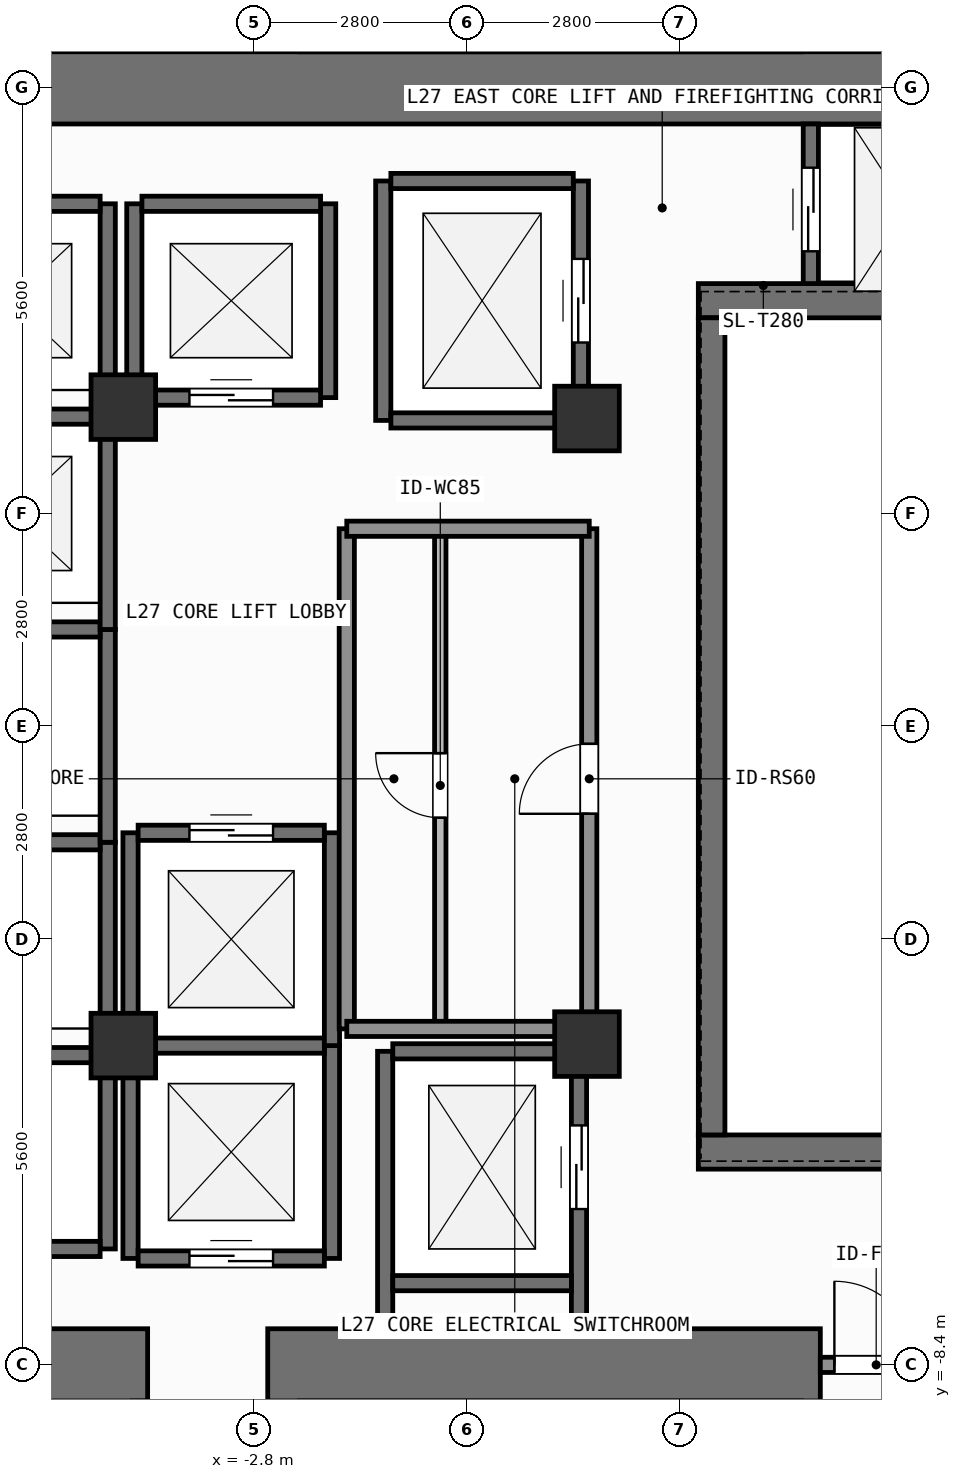
"""IFC4 building model, lengths in metres.
Left out: names, types, materials, properties, quantities, classifications, styles, units other than length and angle.
Written with IfcOpenShell. Run it as: python <this file> out.ifc"""

import sys

from ifc_helpers import new_model, si_unit, direction, frame, frame_2d, origin, origin_2d, place, context, subcontext, project, spatial, rectangle, extrude, element, fill, save


model = new_model("IFC4")
c1 = context("Model", 3, precision=1e-05, world=origin(), true_north=direction((0.0, 1.0)))
c2 = subcontext(c1, "Body", "Model", "MODEL_VIEW")
j1 = project(units=[si_unit("LENGTHUNIT", "METRE"), si_unit("PLANEANGLEUNIT", "RADIAN")], contexts=[c1])
p1 = place(None, origin())
s1 = spatial("IfcSite", under=j1, at=p1, CompositionType="ELEMENT")
p2 = place(p1, origin())
s2 = spatial("IfcBuilding", under=s1, at=p2, CompositionType="ELEMENT")
p3 = place(p2, frame((0.0, 0.0, 108.6)))
s3 = spatial("IfcBuildingStorey", under=s2, at=p3, CompositionType="ELEMENT", Elevation=108.6)
p4 = place(p3, frame((-7.55, -8.4, 0.0), z_axis=(0.0, 0.0, 1.0), x_axis=(1.0, 0.0, 0.0)))
e1 = element("IfcWall", 1, at=p4, inside=s3, PredefinedType="SHEAR", context=c2, shape_type="SweptSolid", body=[
    extrude(rectangle(XDim=3.35, YDim=0.95, at=frame_2d((1.675, 0.0))), origin(), (0.0, 0.0, 1.0), 4.8),
])
p5 = place(p3, frame((-2.62, -8.4, 0.0), z_axis=(0.0, 0.0, 1.0), x_axis=(1.0, 0.0, 0.0)))
e2 = element("IfcWall", 2, at=p5, inside=s3, PredefinedType="SHEAR", context=c2, shape_type="SweptSolid", body=[
    extrude(rectangle(XDim=7.27, YDim=0.95, at=frame_2d((3.635, 0.0))), origin(), (0.0, 0.0, 1.0), 4.8),
])
p6 = place(p3, frame((-7.55, 8.4, 0.0), z_axis=(0.0, 0.0, 1.0), x_axis=(1.0, 0.0, 0.0)))
e3 = element("IfcWall", 3, at=p6, inside=s3, PredefinedType="SHEAR", context=c2, shape_type="SweptSolid", body=[
    extrude(rectangle(XDim=16.425, YDim=0.95, at=frame_2d((8.212, 0.0))), origin(), (0.0, 0.0, 1.0), 4.8),
])
for number, where, z_axis, x_axis in (
    (4, (3.045, -5.6, 0.0), (0.0, 0.0, 1.0), (1.0, 0.0, 0.0)),
    (5, (3.045, 5.6, 0.0), (0.0, 0.0, 1.0), (1.0, 0.0, 0.0)),
):
    element("IfcWall", number, at=place(p3, frame(where, z_axis=z_axis, x_axis=x_axis)), inside=s3, PredefinedType="SHEAR", context=c2, shape_type="SweptSolid", body=[
        extrude(rectangle(XDim=5.83, YDim=0.45, at=frame_2d((2.915, 0.0))), origin(), (0.0, 0.0, 1.0), 4.8),
    ])
p7 = place(p3, frame((3.22, -5.375, 0.0), z_axis=(0.0, 0.0, 1.0), x_axis=(0.0, 1.0, 0.0)))
e6 = element("IfcWall", 6, at=p7, inside=s3, PredefinedType="SHEAR", context=c2, shape_type="SweptSolid", body=[
    extrude(rectangle(XDim=10.75, YDim=0.35, at=frame_2d((5.375, 0.0))), origin(), (0.0, 0.0, 1.0), 4.8),
])
for number, where, z_axis, x_axis in (
    (7, (-4.52, -4.2, 0.0), (0.0, 0.0, 1.0), (1.0, 0.0, 0.0)),
    (8, (1.58, -4.18, 0.0), (0.0, 0.0, 1.0), (1.0, 0.0, 0.0)),
    (9, (1.58, 4.05, 0.0), (0.0, 0.0, 1.0), (1.0, 0.0, 0.0)),
    (10, (-4.52, 4.2, 0.0), (0.0, 0.0, 1.0), (1.0, 0.0, 0.0)),
):
    element("IfcColumn", number, at=place(p3, frame(where, z_axis=z_axis, x_axis=x_axis)), inside=s3, PredefinedType="COLUMN", context=c2, shape_type="SweptSolid", body=[
        extrude(rectangle(XDim=0.85, YDim=0.85, at=origin_2d()), origin(), (0.0, 0.0, 1.0), 4.8),
    ])
p8 = place(p3, frame((-4.725, -6.875, 0.0), z_axis=(0.0, 0.0, 1.0), x_axis=(0.0, 1.0, 0.0)))
e11 = element("IfcWall", 11, at=p8, inside=s3, PredefinedType="SHEAR", context=c2, shape_type="SweptSolid", body=[
    extrude(rectangle(XDim=2.55, YDim=0.2, at=frame_2d((1.275, 0.0))), origin(), (0.0, 0.0, 1.0), 4.58),
])
for number, where, z_axis, x_axis in (
    (12, (-7.175, -6.875, 0.0), (0.0, 0.0, 1.0), (1.0, 0.0, 0.0)),
    (13, (-7.175, -4.325, 0.0), (0.0, 0.0, 1.0), (1.0, 0.0, 0.0)),
):
    element("IfcWall", number, at=place(p3, frame(where, z_axis=z_axis, x_axis=x_axis)), inside=s3, PredefinedType="SHEAR", context=c2, shape_type="SweptSolid", body=[
        extrude(rectangle(XDim=2.35, YDim=0.2, at=frame_2d((1.175, 0.0))), origin(), (0.0, 0.0, 1.0), 4.58),
    ])
p9 = place(p3, frame((-4.725, -4.325, 0.0), z_axis=(0.0, 0.0, 1.0), x_axis=(0.0, 1.0, 0.0)))
e14 = element("IfcWall", 14, at=p9, inside=s3, PredefinedType="SHEAR", context=c2, shape_type="SweptSolid", body=[
    extrude(rectangle(XDim=2.8, YDim=0.2, at=frame_2d((1.4, 0.0))), origin(), (0.0, 0.0, 1.0), 4.58),
])
p10 = place(p3, frame((-7.175, -1.525, 0.0), z_axis=(0.0, 0.0, 1.0), x_axis=(1.0, 0.0, 0.0)))
e15 = element("IfcWall", 15, at=p10, inside=s3, PredefinedType="SHEAR", context=c2, shape_type="SweptSolid", body=[
    extrude(rectangle(XDim=2.35, YDim=0.2, at=frame_2d((1.175, 0.0))), origin(), (0.0, 0.0, 1.0), 4.58),
])
p11 = place(p3, frame((-4.725, -1.525, 0.0), z_axis=(0.0, 0.0, 1.0), x_axis=(0.0, 1.0, 0.0)))
e16 = element("IfcWall", 16, at=p11, inside=s3, PredefinedType="SHEAR", context=c2, shape_type="SweptSolid", body=[
    extrude(rectangle(XDim=2.8, YDim=0.2, at=frame_2d((1.4, 0.0))), origin(), (0.0, 0.0, 1.0), 4.58),
])
p12 = place(p3, frame((-7.175, 1.275, 0.0), z_axis=(0.0, 0.0, 1.0), x_axis=(1.0, 0.0, 0.0)))
e17 = element("IfcWall", 17, at=p12, inside=s3, PredefinedType="SHEAR", context=c2, shape_type="SweptSolid", body=[
    extrude(rectangle(XDim=2.35, YDim=0.2, at=frame_2d((1.175, 0.0))), origin(), (0.0, 0.0, 1.0), 4.58),
])
p13 = place(p3, frame((-4.725, 1.275, 0.0), z_axis=(0.0, 0.0, 1.0), x_axis=(0.0, 1.0, 0.0)))
e18 = element("IfcWall", 18, at=p13, inside=s3, PredefinedType="SHEAR", context=c2, shape_type="SweptSolid", body=[
    extrude(rectangle(XDim=2.8, YDim=0.2, at=frame_2d((1.4, 0.0))), origin(), (0.0, 0.0, 1.0), 4.58),
])
p14 = place(p3, frame((-7.175, 4.075, 0.0), z_axis=(0.0, 0.0, 1.0), x_axis=(1.0, 0.0, 0.0)))
e19 = element("IfcWall", 19, at=p14, inside=s3, PredefinedType="SHEAR", context=c2, shape_type="SweptSolid", body=[
    extrude(rectangle(XDim=2.35, YDim=0.2, at=frame_2d((1.175, 0.0))), origin(), (0.0, 0.0, 1.0), 4.58),
])
p15 = place(p3, frame((-4.725, 4.075, 0.0), z_axis=(0.0, 0.0, 1.0), x_axis=(0.0, 1.0, 0.0)))
e20 = element("IfcWall", 20, at=p15, inside=s3, PredefinedType="SHEAR", context=c2, shape_type="SweptSolid", body=[
    extrude(rectangle(XDim=2.8, YDim=0.2, at=frame_2d((1.4, 0.0))), origin(), (0.0, 0.0, 1.0), 4.58),
])
p16 = place(p3, frame((-7.175, 6.875, 0.0), z_axis=(0.0, 0.0, 1.0), x_axis=(1.0, 0.0, 0.0)))
e21 = element("IfcWall", 21, at=p16, inside=s3, PredefinedType="SHEAR", context=c2, shape_type="SweptSolid", body=[
    extrude(rectangle(XDim=2.35, YDim=0.2, at=frame_2d((1.175, 0.0))), origin(), (0.0, 0.0, 1.0), 4.58),
])
for number, where, z_axis, x_axis in (
    (22, (-4.375, 4.325, 0.0), (0.0, 0.0, 1.0), (0.0, 1.0, 0.0)),
    (23, (-1.825, 4.325, 0.0), (0.0, 0.0, 1.0), (0.0, 1.0, 0.0)),
):
    element("IfcWall", number, at=place(p3, frame(where, z_axis=z_axis, x_axis=x_axis)), inside=s3, PredefinedType="SHEAR", context=c2, shape_type="SweptSolid", body=[
        extrude(rectangle(XDim=2.55, YDim=0.2, at=frame_2d((1.275, 0.0))), origin(), (0.0, 0.0, 1.0), 4.58),
    ])
p17 = place(p3, frame((-4.275, 4.325, 0.0), z_axis=(0.0, 0.0, 1.0), x_axis=(1.0, 0.0, 0.0)))
e24 = element("IfcWall", 24, at=p17, inside=s3, PredefinedType="SHEAR", context=c2, shape_type="SweptSolid", body=[
    extrude(rectangle(XDim=2.35, YDim=0.2, at=frame_2d((1.175, 0.0))), origin(), (0.0, 0.0, 1.0), 4.58),
])
p18 = place(p17, frame((0.625, 0.0, 0.0)))
e25 = element("IfcOpeningElement", 25, at=p18, cuts=e24, PredefinedType="OPENING", context=c2, shape_type="SweptSolid", body=[
    extrude(rectangle(XDim=1.1, YDim=2.2, at=frame_2d((0.55, 1.1))), frame((0.0, 0.11, 0.0), z_axis=(0.0, -1.0, 0.0), x_axis=(1.0, 0.0, 0.0)), (0.0, 0.0, 1.0), 0.22),
])
p19 = place(p3, frame((-4.275, 6.875, 0.0), z_axis=(0.0, 0.0, 1.0), x_axis=(1.0, 0.0, 0.0)))
e26 = element("IfcWall", 26, at=p19, inside=s3, PredefinedType="SHEAR", context=c2, shape_type="SweptSolid", body=[
    extrude(rectangle(XDim=2.35, YDim=0.2, at=frame_2d((1.175, 0.0))), origin(), (0.0, 0.0, 1.0), 4.58),
])
for number, where, z_axis, x_axis in (
    (27, (-4.425, -7.0, 0.0), (0.0, 0.0, 1.0), (0.0, 1.0, 0.0)),
    (28, (-1.775, -7.0, 0.0), (0.0, 0.0, 1.0), (0.0, 1.0, 0.0)),
):
    element("IfcWall", number, at=place(p3, frame(where, z_axis=z_axis, x_axis=x_axis)), inside=s3, PredefinedType="SHEAR", context=c2, shape_type="SweptSolid", body=[
        extrude(rectangle(XDim=2.8, YDim=0.2, at=frame_2d((1.4, 0.0))), origin(), (0.0, 0.0, 1.0), 4.58),
    ])
p20 = place(p3, frame((-4.325, -7.0, 0.0), z_axis=(0.0, 0.0, 1.0), x_axis=(1.0, 0.0, 0.0)))
e29 = element("IfcWall", 29, at=p20, inside=s3, PredefinedType="SHEAR", context=c2, shape_type="SweptSolid", body=[
    extrude(rectangle(XDim=2.45, YDim=0.2, at=frame_2d((1.225, 0.0))), origin(), (0.0, 0.0, 1.0), 4.58),
])
p21 = place(p20, frame((0.675, 0.0, 0.0)))
e30 = element("IfcOpeningElement", 30, at=p21, cuts=e29, PredefinedType="OPENING", context=c2, shape_type="SweptSolid", body=[
    extrude(rectangle(XDim=1.1, YDim=2.2, at=frame_2d((0.55, 1.1))), frame((0.0, 0.11, 0.0), z_axis=(0.0, -1.0, 0.0), x_axis=(1.0, 0.0, 0.0)), (0.0, 0.0, 1.0), 0.22),
])
p22 = place(p3, frame((-4.325, -4.2, 0.0), z_axis=(0.0, 0.0, 1.0), x_axis=(1.0, 0.0, 0.0)))
e31 = element("IfcWall", 31, at=p22, inside=s3, PredefinedType="SHEAR", context=c2, shape_type="SweptSolid", body=[
    extrude(rectangle(XDim=2.45, YDim=0.2, at=frame_2d((1.225, 0.0))), origin(), (0.0, 0.0, 1.0), 4.58),
])
for number, where, z_axis, x_axis in (
    (32, (-4.425, -4.2, 0.0), (0.0, 0.0, 1.0), (0.0, 1.0, 0.0)),
    (33, (-1.775, -4.2, 0.0), (0.0, 0.0, 1.0), (0.0, 1.0, 0.0)),
):
    element("IfcWall", number, at=place(p3, frame(where, z_axis=z_axis, x_axis=x_axis)), inside=s3, PredefinedType="SHEAR", context=c2, shape_type="SweptSolid", body=[
        extrude(rectangle(XDim=2.8, YDim=0.2, at=frame_2d((1.4, 0.0))), origin(), (0.0, 0.0, 1.0), 4.58),
    ])
p23 = place(p3, frame((-4.325, -1.4, 0.0), z_axis=(0.0, 0.0, 1.0), x_axis=(1.0, 0.0, 0.0)))
e34 = element("IfcWall", 34, at=p23, inside=s3, PredefinedType="SHEAR", context=c2, shape_type="SweptSolid", body=[
    extrude(rectangle(XDim=2.45, YDim=0.2, at=frame_2d((1.225, 0.0))), origin(), (0.0, 0.0, 1.0), 4.58),
])
p24 = place(p23, frame((0.675, 0.0, 0.0)))
e35 = element("IfcOpeningElement", 35, at=p24, cuts=e34, PredefinedType="OPENING", context=c2, shape_type="SweptSolid", body=[
    extrude(rectangle(XDim=1.1, YDim=2.2, at=frame_2d((0.55, 1.1))), frame((0.0, 0.11, 0.0), z_axis=(0.0, -1.0, 0.0), x_axis=(1.0, 0.0, 0.0)), (0.0, 0.0, 1.0), 0.22),
])
p25 = place(p3, frame((-1.1, 4.025, 0.0), z_axis=(0.0, 0.0, 1.0), x_axis=(0.0, 1.0, 0.0)))
e36 = element("IfcWall", 36, at=p25, inside=s3, PredefinedType="SHEAR", context=c2, shape_type="SweptSolid", body=[
    extrude(rectangle(XDim=3.15, YDim=0.2, at=frame_2d((1.575, 0.0))), origin(), (0.0, 0.0, 1.0), 4.58),
])
p26 = place(p3, frame((1.5, 4.025, 0.0), z_axis=(0.0, 0.0, 1.0), x_axis=(0.0, 1.0, 0.0)))
e37 = element("IfcWall", 37, at=p26, inside=s3, PredefinedType="SHEAR", context=c2, shape_type="SweptSolid", body=[
    extrude(rectangle(XDim=3.15, YDim=0.2, at=frame_2d((1.575, 0.0))), origin(), (0.0, 0.0, 1.0), 4.58),
])
p27 = place(p26, frame((1.025, 0.0, 0.0)))
e38 = element("IfcOpeningElement", 38, at=p27, cuts=e37, PredefinedType="OPENING", context=c2, shape_type="SweptSolid", body=[
    extrude(rectangle(XDim=1.1, YDim=2.2, at=frame_2d((0.55, 1.1))), frame((0.0, 0.11, 0.0), z_axis=(0.0, -1.0, 0.0), x_axis=(1.0, 0.0, 0.0)), (0.0, 0.0, 1.0), 0.22),
])
for number, where, z_axis, x_axis in (
    (39, (-1.0, 4.025, 0.0), (0.0, 0.0, 1.0), (1.0, 0.0, 0.0)),
    (40, (-1.0, 7.175, 0.0), (0.0, 0.0, 1.0), (1.0, 0.0, 0.0)),
):
    element("IfcWall", number, at=place(p3, frame(where, z_axis=z_axis, x_axis=x_axis)), inside=s3, PredefinedType="SHEAR", context=c2, shape_type="SweptSolid", body=[
        extrude(rectangle(XDim=2.4, YDim=0.2, at=frame_2d((1.2, 0.0))), origin(), (0.0, 0.0, 1.0), 4.58),
    ])
p28 = place(p3, frame((-1.075, -7.925, 0.0), z_axis=(0.0, 0.0, 1.0), x_axis=(0.0, 1.0, 0.0)))
e41 = element("IfcWall", 41, at=p28, inside=s3, PredefinedType="SHEAR", context=c2, shape_type="SweptSolid", body=[
    extrude(rectangle(XDim=3.65, YDim=0.2, at=frame_2d((1.825, 0.0))), origin(), (0.0, 0.0, 1.0), 4.58),
])
p29 = place(p3, frame((1.475, -7.925, 0.0), z_axis=(0.0, 0.0, 1.0), x_axis=(0.0, 1.0, 0.0)))
e42 = element("IfcWall", 42, at=p29, inside=s3, PredefinedType="SHEAR", context=c2, shape_type="SweptSolid", body=[
    extrude(rectangle(XDim=3.65, YDim=0.2, at=frame_2d((1.825, 0.0))), origin(), (0.0, 0.0, 1.0), 4.58),
])
p30 = place(p29, frame((1.575, 0.0, 0.0)))
e43 = element("IfcOpeningElement", 43, at=p30, cuts=e42, PredefinedType="OPENING", context=c2, shape_type="SweptSolid", body=[
    extrude(rectangle(XDim=1.1, YDim=2.2, at=frame_2d((0.55, 1.1))), frame((0.0, 0.11, 0.0), z_axis=(0.0, -1.0, 0.0), x_axis=(1.0, 0.0, 0.0)), (0.0, 0.0, 1.0), 0.22),
])
for number, where, z_axis, x_axis in (
    (44, (-0.975, -7.325, 0.0), (0.0, 0.0, 1.0), (1.0, 0.0, 0.0)),
    (45, (-0.975, -4.275, 0.0), (0.0, 0.0, 1.0), (1.0, 0.0, 0.0)),
):
    element("IfcWall", number, at=place(p3, frame(where, z_axis=z_axis, x_axis=x_axis)), inside=s3, PredefinedType="SHEAR", context=c2, shape_type="SweptSolid", body=[
        extrude(rectangle(XDim=2.35, YDim=0.2, at=frame_2d((1.175, 0.0))), origin(), (0.0, 0.0, 1.0), 4.58),
    ])
p31 = place(p3, frame((4.525, 5.825, 0.0), z_axis=(0.0, 0.0, 1.0), x_axis=(0.0, 1.0, 0.0)))
e46 = element("IfcWall", 46, at=p31, inside=s3, PredefinedType="SHEAR", context=c2, shape_type="SweptSolid", body=[
    extrude(rectangle(XDim=2.1, YDim=0.2, at=frame_2d((1.05, 0.0))), origin(), (0.0, 0.0, 1.0), 4.58),
])
p32 = place(p31, frame((0.425, 0.0, 0.0)))
e47 = element("IfcOpeningElement", 47, at=p32, cuts=e46, PredefinedType="OPENING", context=c2, shape_type="SweptSolid", body=[
    extrude(rectangle(XDim=1.1, YDim=2.2, at=frame_2d((0.55, 1.1))), frame((0.0, 0.11, 0.0), z_axis=(0.0, -1.0, 0.0), x_axis=(1.0, 0.0, 0.0)), (0.0, 0.0, 1.0), 0.22),
])
p33 = place(p3, frame((4.65, -8.4, 0.0), z_axis=(0.0, 0.0, 1.0), x_axis=(1.0, 0.0, 0.0)))
e48 = element("IfcWall", 48, at=p33, inside=s3, PredefinedType="SOLIDWALL", context=c2, shape_type="SweptSolid", body=[
    extrude(rectangle(XDim=1.47, YDim=0.2, at=frame_2d((0.735, 0.0))), origin(), (0.0, 0.0, 1.0), 3.62),
])
p34 = place(p33, frame((0.185, 0.0, 0.0)))
e49 = element("IfcOpeningElement", 49, at=p34, cuts=e48, PredefinedType="OPENING", context=c2, shape_type="SweptSolid", body=[
    extrude(rectangle(XDim=1.1, YDim=2.15, at=frame_2d((0.55, 1.075))), frame((0.0, 0.11, 0.0), z_axis=(0.0, -1.0, 0.0), x_axis=(1.0, 0.0, 0.0)), (0.0, 0.0, 1.0), 0.22),
])
p35 = place(p3, frame((-0.35, -3.98, 0.0), z_axis=(0.0, 0.0, 1.0), x_axis=(0.0, 1.0, 0.0)))
e50 = element("IfcWall", 50, at=p35, inside=s3, PredefinedType="PARTITIONING", context=c2, shape_type="SweptSolid", body=[
    extrude(rectangle(XDim=6.58, YDim=0.15, at=frame_2d((3.29, 0.0))), origin(), (0.0, 0.0, 1.0), 4.58),
])
p36 = place(p35, frame((2.778, 0.0, 0.0)))
e51 = element("IfcOpeningElement", 51, at=p36, cuts=e50, PredefinedType="OPENING", context=c2, shape_type="SweptSolid", body=[
    extrude(rectangle(XDim=0.85, YDim=2.1, at=frame_2d((0.425, 1.05))), frame((0.0, 0.085, 0.0), z_axis=(0.0, -1.0, 0.0), x_axis=(1.0, 0.0, 0.0)), (0.0, 0.0, 1.0), 0.17),
])
p37 = place(p3, frame((1.61, -3.98, 0.0), z_axis=(0.0, 0.0, 1.0), x_axis=(0.0, 1.0, 0.0)))
e52 = element("IfcWall", 52, at=p37, inside=s3, PredefinedType="SOLIDWALL", context=c2, shape_type="SweptSolid", body=[
    extrude(rectangle(XDim=6.58, YDim=0.2, at=frame_2d((3.29, 0.0))), origin(), (0.0, 0.0, 1.0), 4.58),
])
p38 = place(p37, frame((2.83, 0.0, 0.0)))
e53 = element("IfcOpeningElement", 53, at=p38, cuts=e52, PredefinedType="OPENING", context=c2, shape_type="SweptSolid", body=[
    extrude(rectangle(XDim=0.92, YDim=2.1, at=frame_2d((0.46, 1.05))), frame((0.0, 0.11, 0.0), z_axis=(0.0, -1.0, 0.0), x_axis=(1.0, 0.0, 0.0)), (0.0, 0.0, 1.0), 0.22),
])
p39 = place(p3, frame((-1.58, -3.98, 0.0), z_axis=(0.0, 0.0, 1.0), x_axis=(0.0, 1.0, 0.0)))
e54 = element("IfcWall", 54, at=p39, inside=s3, PredefinedType="SOLIDWALL", context=c2, shape_type="SweptSolid", body=[
    extrude(rectangle(XDim=6.58, YDim=0.2, at=frame_2d((3.29, 0.0))), origin(), (0.0, 0.0, 1.0), 4.58),
])
for number, where, z_axis, x_axis in (
    (55, (-1.58, -3.98, 0.0), (0.0, 0.0, 1.0), (1.0, 0.0, 0.0)),
    (56, (-1.58, 2.6, 0.0), (0.0, 0.0, 1.0), (1.0, 0.0, 0.0)),
):
    element("IfcWall", number, at=place(p3, frame(where, z_axis=z_axis, x_axis=x_axis)), inside=s3, PredefinedType="SOLIDWALL", context=c2, shape_type="SweptSolid", body=[
        extrude(rectangle(XDim=3.19, YDim=0.2, at=frame_2d((1.595, 0.0))), origin(), (0.0, 0.0, 1.0), 4.58),
    ])
p40 = place(p18, origin())
e57 = element("IfcDoor", 57, at=p40, inside=s3, OperationType="SLIDING_TO_LEFT", PredefinedType="DOOR", context=c2, shape_type="SweptSolid", body=[
    extrude(rectangle(XDim=1.1, YDim=2.2, at=frame_2d((0.55, 1.1))), frame((0.0, 0.025, 0.0), z_axis=(0.0, -1.0, 0.0), x_axis=(1.0, 0.0, 0.0)), (0.0, 0.0, 1.0), 0.05),
])
fill(e25, e57)
p41 = place(p21, origin())
e58 = element("IfcDoor", 58, at=p41, inside=s3, OperationType="SLIDING_TO_LEFT", PredefinedType="DOOR", context=c2, shape_type="SweptSolid", body=[
    extrude(rectangle(XDim=1.1, YDim=2.2, at=frame_2d((0.55, 1.1))), frame((0.0, 0.025, 0.0), z_axis=(0.0, -1.0, 0.0), x_axis=(1.0, 0.0, 0.0)), (0.0, 0.0, 1.0), 0.05),
])
fill(e30, e58)
p42 = place(p24, origin())
e59 = element("IfcDoor", 59, at=p42, inside=s3, OperationType="SLIDING_TO_LEFT", PredefinedType="DOOR", context=c2, shape_type="SweptSolid", body=[
    extrude(rectangle(XDim=1.1, YDim=2.2, at=frame_2d((0.55, 1.1))), frame((0.0, 0.025, 0.0), z_axis=(0.0, -1.0, 0.0), x_axis=(1.0, 0.0, 0.0)), (0.0, 0.0, 1.0), 0.05),
])
fill(e35, e59)
p43 = place(p27, origin())
e60 = element("IfcDoor", 60, at=p43, inside=s3, OperationType="SLIDING_TO_LEFT", PredefinedType="DOOR", context=c2, shape_type="SweptSolid", body=[
    extrude(rectangle(XDim=1.1, YDim=2.2, at=frame_2d((0.55, 1.1))), frame((0.0, 0.025, 0.0), z_axis=(0.0, -1.0, 0.0), x_axis=(1.0, 0.0, 0.0)), (0.0, 0.0, 1.0), 0.05),
])
fill(e38, e60)
p44 = place(p30, origin())
e61 = element("IfcDoor", 61, at=p44, inside=s3, OperationType="SLIDING_TO_LEFT", PredefinedType="DOOR", context=c2, shape_type="SweptSolid", body=[
    extrude(rectangle(XDim=1.1, YDim=2.2, at=frame_2d((0.55, 1.1))), frame((0.0, 0.025, 0.0), z_axis=(0.0, -1.0, 0.0), x_axis=(1.0, 0.0, 0.0)), (0.0, 0.0, 1.0), 0.05),
])
fill(e43, e61)
p45 = place(p32, origin())
e62 = element("IfcDoor", 62, at=p45, inside=s3, OperationType="SLIDING_TO_LEFT", PredefinedType="DOOR", context=c2, shape_type="SweptSolid", body=[
    extrude(rectangle(XDim=1.1, YDim=2.2, at=frame_2d((0.55, 1.1))), frame((0.0, 0.025, 0.0), z_axis=(0.0, -1.0, 0.0), x_axis=(1.0, 0.0, 0.0)), (0.0, 0.0, 1.0), 0.05),
])
fill(e47, e62)
p46 = place(p34, origin())
e63 = element("IfcDoor", 63, at=p46, inside=s3, OperationType="SINGLE_SWING_LEFT", PredefinedType="DOOR", context=c2, shape_type="SweptSolid", body=[
    extrude(rectangle(XDim=1.1, YDim=2.15, at=frame_2d((0.55, 1.075))), frame((0.0, 0.025, 0.0), z_axis=(0.0, -1.0, 0.0), x_axis=(1.0, 0.0, 0.0)), (0.0, 0.0, 1.0), 0.05),
])
fill(e49, e63)
p47 = place(p36, origin())
e64 = element("IfcDoor", 64, at=p47, inside=s3, OperationType="SINGLE_SWING_RIGHT", PredefinedType="DOOR", context=c2, shape_type="SweptSolid", body=[
    extrude(rectangle(XDim=0.85, YDim=2.1, at=frame_2d((0.425, 1.05))), frame((0.0, 0.025, 0.0), z_axis=(0.0, -1.0, 0.0), x_axis=(1.0, 0.0, 0.0)), (0.0, 0.0, 1.0), 0.05),
])
fill(e51, e64)
p48 = place(p38, origin())
e65 = element("IfcDoor", 65, at=p48, inside=s3, OperationType="SINGLE_SWING_LEFT", PredefinedType="DOOR", context=c2, shape_type="SweptSolid", body=[
    extrude(rectangle(XDim=0.92, YDim=2.1, at=frame_2d((0.46, 1.05))), frame((0.0, 0.025, 0.0), z_axis=(0.0, -1.0, 0.0), x_axis=(1.0, 0.0, 0.0)), (0.0, 0.0, 1.0), 0.05),
])
fill(e53, e65)
save(model, sys.argv[1])
